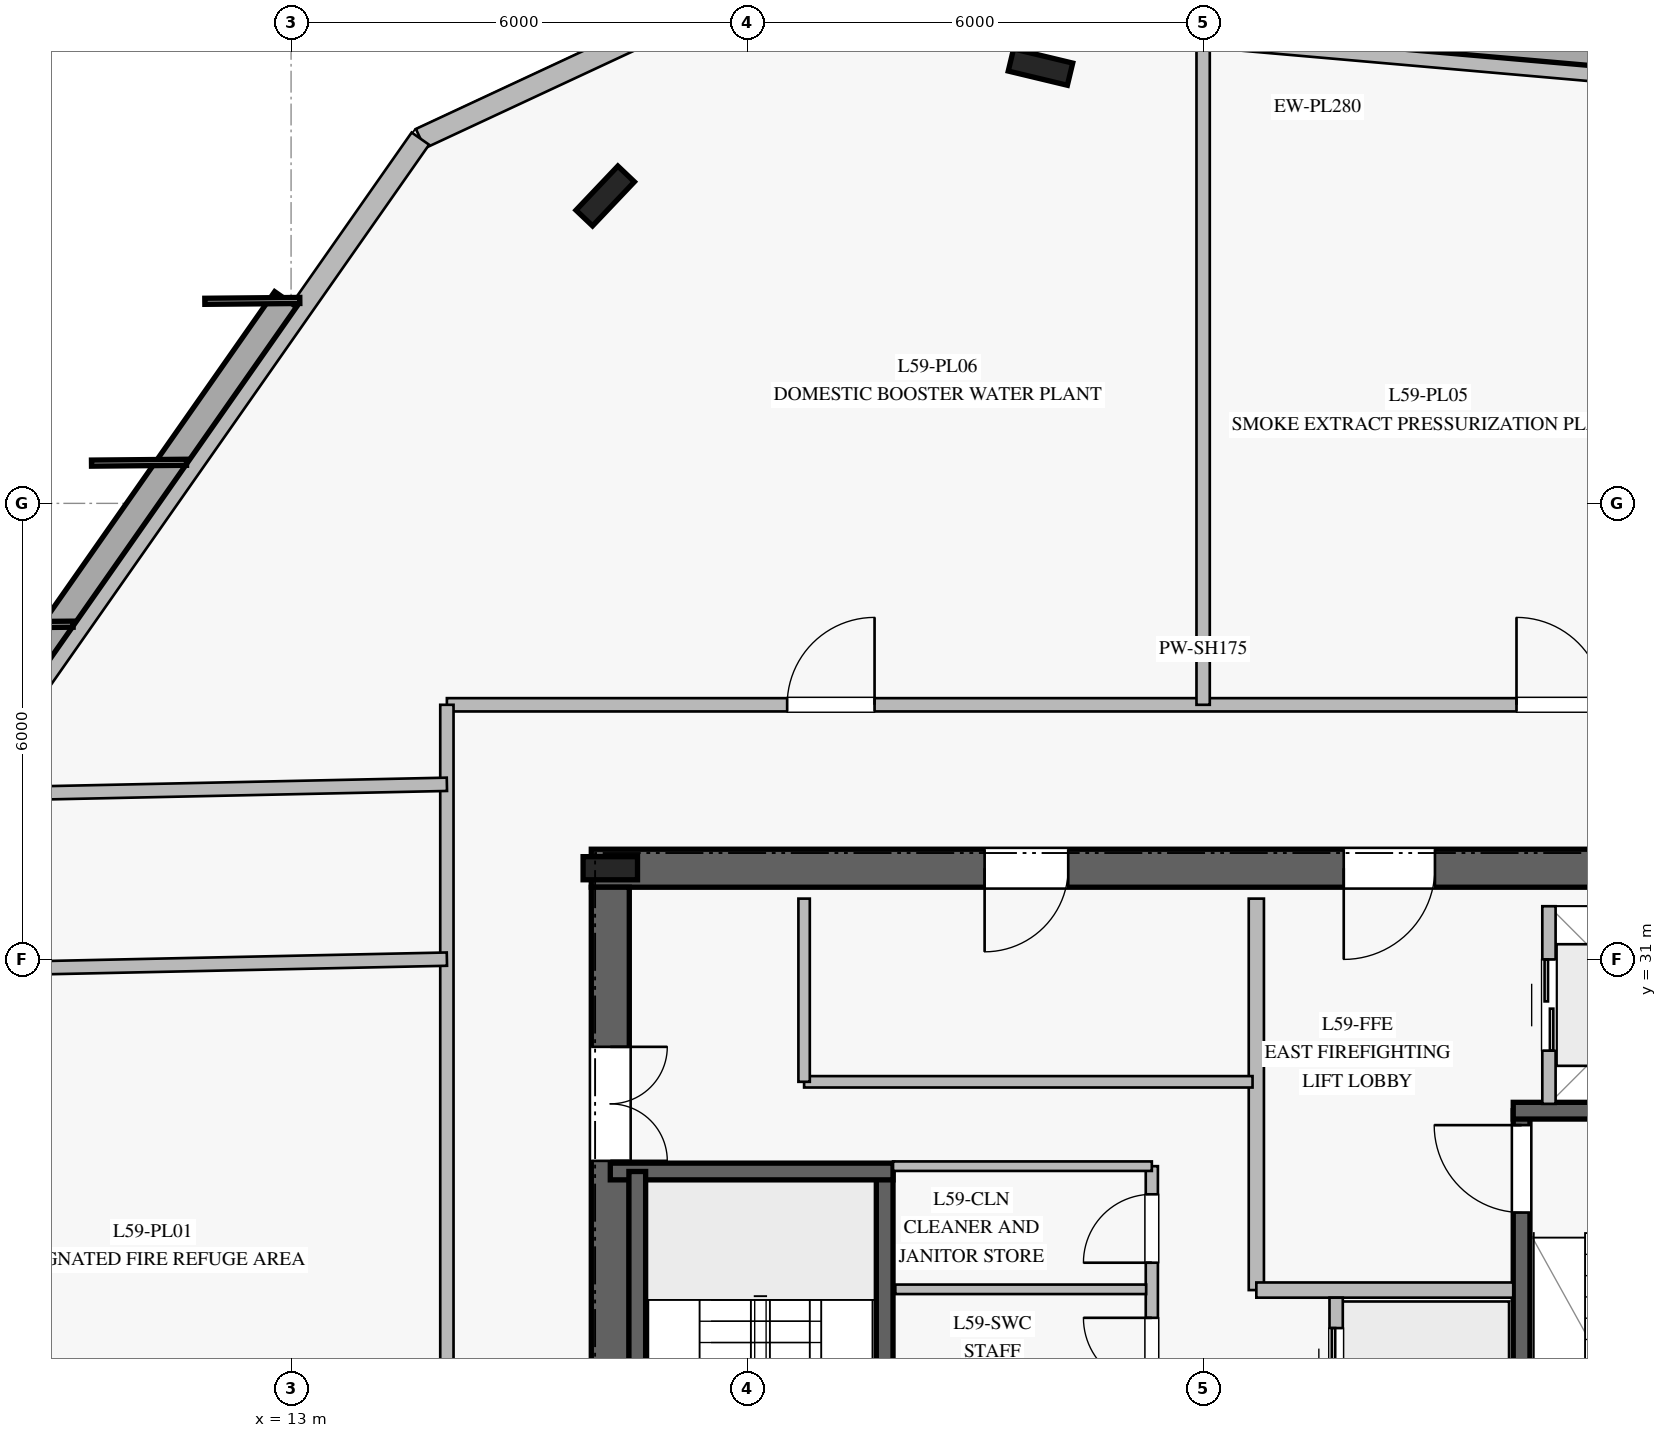
"""IFC4 building model, lengths in metres.
Left out: names, types, materials, properties, quantities, classifications, styles, units other than length and angle.
Written with IfcOpenShell. Run it as: python <this file> out.ifc"""

import sys

from ifc_helpers import new_model, si_unit, direction, frame, frame_2d, origin, origin_2d, place, context, subcontext, project, spatial, rectangle, i_section, extrude, element, fill, save


model = new_model("IFC4")
c1 = context("Model", 3, precision=1e-05, world=origin(), true_north=direction((0.0, 1.0)))
c2 = subcontext(c1, "Body", "Model", "MODEL_VIEW")
j1 = project(units=[si_unit("LENGTHUNIT", "METRE"), si_unit("PLANEANGLEUNIT", "RADIAN")], contexts=[c1])
p1 = place(None, origin())
s1 = spatial("IfcSite", under=j1, at=p1, CompositionType="ELEMENT")
p2 = place(p1, origin())
s2 = spatial("IfcBuilding", under=s1, at=p2, CompositionType="ELEMENT")
p3 = place(p2, frame((0.0, 0.0, 244.8)))
s3 = spatial("IfcBuildingStorey", under=s2, at=p3, CompositionType="ELEMENT", Elevation=244.8)
p4 = place(p3, frame((33.05, 32.2, 0.0), z_axis=(0.0, 0.0, 1.0), x_axis=(-1.0, 0.0, 0.0)))
e1 = element("IfcWall", 1, at=p4, inside=s3, PredefinedType="SHEAR", context=c2, shape_type="SweptSolid", body=[
    extrude(rectangle(XDim=16.1, YDim=0.5, at=frame_2d((8.05, 0.0))), origin(), (0.0, 0.0, 1.0), 5.18),
])
p5 = place(p4, frame((5.0, 0.0, 0.0)))
e2 = element("IfcOpeningElement", 2, at=p5, cuts=e1, PredefinedType="OPENING", context=c2, shape_type="SweptSolid", body=[
    extrude(rectangle(XDim=1.2, YDim=2.25, at=frame_2d((0.6, 1.125))), frame((0.0, 0.26, 0.0), z_axis=(0.0, -1.0, 0.0), x_axis=(1.0, 0.0, 0.0)), (0.0, 0.0, 1.0), 0.52),
])
p6 = place(p4, frame((9.825, 0.0, 0.0)))
e3 = element("IfcOpeningElement", 3, at=p6, cuts=e1, PredefinedType="OPENING", context=c2, shape_type="SweptSolid", body=[
    extrude(rectangle(XDim=1.1, YDim=2.2, at=frame_2d((0.55, 1.1))), frame((0.0, 0.26, 0.0), z_axis=(0.0, -1.0, 0.0), x_axis=(1.0, 0.0, 0.0)), (0.0, 0.0, 1.0), 0.52),
])
p7 = place(p3, frame((17.2, 31.95, 0.0), z_axis=(0.0, 0.0, 1.0), x_axis=(0.0, -1.0, 0.0)))
e4 = element("IfcWall", 4, at=p7, inside=s3, PredefinedType="SHEAR", context=c2, shape_type="SweptSolid", body=[
    extrude(rectangle(XDim=13.9, YDim=0.5, at=frame_2d((6.95, 0.0))), origin(), (0.0, 0.0, 1.0), 5.18),
])
p8 = place(p7, frame((2.1, 0.0, 0.0)))
e5 = element("IfcOpeningElement", 5, at=p8, cuts=e4, PredefinedType="OPENING", context=c2, shape_type="SweptSolid", body=[
    extrude(rectangle(XDim=1.5, YDim=2.2, at=frame_2d((0.75, 1.1))), frame((0.0, 0.26, 0.0), z_axis=(0.0, -1.0, 0.0), x_axis=(1.0, 0.0, 0.0)), (0.0, 0.0, 1.0), 0.52),
])
p9 = place(p3, frame((17.2, 32.2, 0.0), z_axis=(0.0, 0.0, 1.0), x_axis=(1.0, 0.0, 0.0)))
e6 = element("IfcColumn", 6, at=p9, inside=s3, PredefinedType="COLUMN", context=c2, shape_type="SweptSolid", body=[
    extrude(i_section(OverallWidth=0.304, OverallDepth=0.716, WebThickness=0.021, FlangeThickness=0.04, at=origin_2d()), origin(), (0.0, 0.0, 1.0), 5.4),
])
p10 = place(p3, frame((20.81, 20.99, 0.0), z_axis=(0.0, 0.0, 1.0), x_axis=(0.0, 1.0, 0.0)))
e7 = element("IfcWall", 7, at=p10, inside=s3, PredefinedType="SOLIDWALL", context=c2, shape_type="SweptSolid", body=[
    extrude(rectangle(XDim=7.22, YDim=0.22, at=frame_2d((3.61, 0.0))), origin(), (0.0, 0.0, 1.0), 5.18),
])
p11 = place(p10, frame((0.18, 0.0, 0.0)))
e8 = element("IfcOpeningElement", 8, at=p11, cuts=e7, PredefinedType="OPENING", context=c2, shape_type="SweptSolid", body=[
    extrude(rectangle(XDim=1.15, YDim=2.2, at=frame_2d((0.575, 1.1))), frame((0.0, 0.12, 0.0), z_axis=(0.0, -1.0, 0.0), x_axis=(1.0, 0.0, 0.0)), (0.0, 0.0, 1.0), 0.24),
])
p12 = place(p3, frame((17.2, 28.21, 0.0), z_axis=(0.0, 0.0, 1.0), x_axis=(1.0, 0.0, 0.0)))
e9 = element("IfcWall", 9, at=p12, inside=s3, PredefinedType="SOLIDWALL", context=c2, shape_type="SweptSolid", body=[
    extrude(rectangle(XDim=3.72, YDim=0.22, at=frame_2d((1.86, 0.0))), origin(), (0.0, 0.0, 1.0), 5.18),
])
p13 = place(p3, frame((17.555, 28.21, 0.0), z_axis=(0.0, 0.0, 1.0), x_axis=(0.0, -1.0, 0.0)))
e10 = element("IfcWall", 10, at=p13, inside=s3, PredefinedType="SOLIDWALL", context=c2, shape_type="SweptSolid", body=[
    extrude(rectangle(XDim=7.22, YDim=0.22, at=frame_2d((3.61, 0.0))), origin(), (0.0, 0.0, 1.0), 5.18),
])
p14 = place(p3, frame((29.19, 21.79, 0.0), z_axis=(0.0, 0.0, 1.0), x_axis=(0.0, 1.0, 0.0)))
e11 = element("IfcWall", 11, at=p14, inside=s3, PredefinedType="SOLIDWALL", context=c2, shape_type="SweptSolid", body=[
    extrude(rectangle(XDim=7.22, YDim=0.22, at=frame_2d((3.61, 0.0))), origin(), (0.0, 0.0, 1.0), 5.18),
])
p15 = place(p14, frame((5.88, 0.0, 0.0)))
e12 = element("IfcOpeningElement", 12, at=p15, cuts=e11, PredefinedType="OPENING", context=c2, shape_type="SweptSolid", body=[
    extrude(rectangle(XDim=1.15, YDim=2.2, at=frame_2d((0.575, 1.1))), frame((0.0, 0.12, 0.0), z_axis=(0.0, -1.0, 0.0), x_axis=(1.0, 0.0, 0.0)), (0.0, 0.0, 1.0), 0.24),
])
p16 = place(p3, frame((29.08, 29.01, 0.0), z_axis=(0.0, 0.0, 1.0), x_axis=(1.0, 0.0, 0.0)))
e13 = element("IfcWall", 13, at=p16, inside=s3, PredefinedType="SOLIDWALL", context=c2, shape_type="SweptSolid", body=[
    extrude(rectangle(XDim=3.72, YDim=0.22, at=frame_2d((1.86, 0.0))), origin(), (0.0, 0.0, 1.0), 5.18),
])
for number, where, z_axis, x_axis in (
    (14, (22.86, 42.74, 0.0), (0.0, 0.0, 1.0), (-0.972, 0.233, 0.0)),
    (15, (17.133, 41.044, 0.0), (0.0, 0.0, 1.0), (0.688, 0.725, 0.0)),
):
    element("IfcColumn", number, at=place(p3, frame(where, z_axis=z_axis, x_axis=x_axis)), inside=s3, PredefinedType="COLUMN", context=c2, shape_type="SweptSolid", body=[
        extrude(i_section(OverallWidth=0.3, OverallDepth=0.8, WebThickness=0.018, FlangeThickness=0.033, at=origin_2d()), origin(), (0.0, 0.0, 1.0), 5.4),
    ])
p17 = place(p3, frame((34.399, 42.318, 0.0), z_axis=(0.0, 0.0, 1.0), x_axis=(-0.996195370644, 0.087148055094, 0.0)))
e16 = element("IfcWall", 16, at=p17, inside=s3, PredefinedType="STANDARD", context=c2, shape_type="SweptSolid", body=[
    extrude(rectangle(XDim=15.708, YDim=0.28, at=frame_2d((7.854, 0.0))), origin(), (0.0, 0.0, 1.0), 5.18),
])
p18 = place(p3, frame((18.751, 43.687, 0.0), z_axis=(0.0, 0.0, 1.0), x_axis=(-0.906361723837, -0.422502574624, 0.0)))
e17 = element("IfcWall", 17, at=p18, inside=s3, PredefinedType="STANDARD", context=c2, shape_type="SweptSolid", body=[
    extrude(rectangle(XDim=4.469, YDim=0.28, at=frame_2d((2.234, 0.0))), origin(), (0.0, 0.0, 1.0), 5.18),
])
p19 = place(p3, frame((14.701, 41.799, 0.0), z_axis=(0.0, 0.0, 1.0), x_axis=(-0.573547879244, -0.819172039449, 0.0)))
e18 = element("IfcWall", 18, at=p19, inside=s3, PredefinedType="STANDARD", context=c2, shape_type="SweptSolid", body=[
    extrude(rectangle(XDim=15.708, YDim=0.28, at=frame_2d((7.854, 0.0))), origin(), (0.0, 0.0, 1.0), 5.18),
])
p20 = place(p3, frame((25.7, 26.65, 0.0), z_axis=(0.0, 0.0, 1.0), x_axis=(0.0, 1.0, 0.0)))
e19 = element("IfcWall", 19, at=p20, inside=s3, PredefinedType="PARTITIONING", context=c2, shape_type="SweptSolid", body=[
    extrude(rectangle(XDim=5.15, YDim=0.2, at=frame_2d((2.575, 0.0))), origin(), (0.0, 0.0, 1.0), 5.18),
])
p21 = place(p3, frame((25.7, 26.65, 0.0), z_axis=(0.0, 0.0, 1.0), x_axis=(1.0, 0.0, 0.0)))
e20 = element("IfcWall", 20, at=p21, inside=s3, PredefinedType="PARTITIONING", context=c2, shape_type="SweptSolid", body=[
    extrude(rectangle(XDim=3.38, YDim=0.2, at=frame_2d((1.69, 0.0))), origin(), (0.0, 0.0, 1.0), 5.18),
])
p22 = place(p3, frame((24.325, 23.35, 0.0), z_axis=(0.0, 0.0, 1.0), x_axis=(0.0, 1.0, 0.0)))
e21 = element("IfcWall", 21, at=p22, inside=s3, PredefinedType="PLUMBINGWALL", context=c2, shape_type="SweptSolid", body=[
    extrude(rectangle(XDim=4.93, YDim=0.16, at=frame_2d((2.465, 0.0))), origin(), (0.0, 0.0, 1.0), 5.18),
])
p23 = place(p22, frame((0.375, 0.0, 0.0)))
e22 = element("IfcOpeningElement", 22, at=p23, cuts=e21, PredefinedType="OPENING", context=c2, shape_type="SweptSolid", body=[
    extrude(rectangle(XDim=0.95, YDim=2.1, at=frame_2d((0.475, 1.05))), frame((0.0, 0.09, 0.0), z_axis=(0.0, -1.0, 0.0), x_axis=(1.0, 0.0, 0.0)), (0.0, 0.0, 1.0), 0.18),
])
p24 = place(p22, frame((2.035, 0.0, 0.0)))
e23 = element("IfcOpeningElement", 23, at=p24, cuts=e21, PredefinedType="OPENING", context=c2, shape_type="SweptSolid", body=[
    extrude(rectangle(XDim=0.9, YDim=2.1, at=frame_2d((0.45, 1.05))), frame((0.0, 0.09, 0.0), z_axis=(0.0, -1.0, 0.0), x_axis=(1.0, 0.0, 0.0)), (0.0, 0.0, 1.0), 0.18),
])
p25 = place(p22, frame((3.66, 0.0, 0.0)))
e24 = element("IfcOpeningElement", 24, at=p25, cuts=e21, PredefinedType="OPENING", context=c2, shape_type="SweptSolid", body=[
    extrude(rectangle(XDim=0.9, YDim=2.1, at=frame_2d((0.45, 1.05))), frame((0.0, 0.09, 0.0), z_axis=(0.0, -1.0, 0.0), x_axis=(1.0, 0.0, 0.0)), (0.0, 0.0, 1.0), 0.18),
])
p26 = place(p3, frame((20.92, 28.28, 0.0), z_axis=(0.0, 0.0, 1.0), x_axis=(1.0, 0.0, 0.0)))
e25 = element("IfcWall", 25, at=p26, inside=s3, PredefinedType="PARTITIONING", context=c2, shape_type="SweptSolid", body=[
    extrude(rectangle(XDim=3.405, YDim=0.125, at=frame_2d((1.703, 0.0))), origin(), (0.0, 0.0, 1.0), 5.18),
])
p27 = place(p3, frame((20.95, 26.66, 0.0), z_axis=(0.0, 0.0, 1.0), x_axis=(1.0, 0.0, 0.0)))
e26 = element("IfcWall", 26, at=p27, inside=s3, PredefinedType="PARTITIONING", context=c2, shape_type="SweptSolid", body=[
    extrude(rectangle(XDim=3.3, YDim=0.125, at=frame_2d((1.65, 0.0))), origin(), (0.0, 0.0, 1.0), 5.18),
])
p28 = place(p3, frame((19.75, 29.39, 0.0), z_axis=(0.0, 0.0, 1.0), x_axis=(1.0, 0.0, 0.0)))
e27 = element("IfcWall", 27, at=p28, inside=s3, PredefinedType="PARTITIONING", context=c2, shape_type="SweptSolid", body=[
    extrude(rectangle(XDim=5.9, YDim=0.15, at=frame_2d((2.95, 0.0))), origin(), (0.0, 0.0, 1.0), 5.18),
])
p29 = place(p3, frame((19.75, 29.39, 0.0), z_axis=(0.0, 0.0, 1.0), x_axis=(0.0, 1.0, 0.0)))
e28 = element("IfcWall", 28, at=p29, inside=s3, PredefinedType="PARTITIONING", context=c2, shape_type="SweptSolid", body=[
    extrude(rectangle(XDim=2.41, YDim=0.15, at=frame_2d((1.205, 0.0))), origin(), (0.0, 0.0, 1.0), 5.18),
])
p30 = place(p3, frame((26.75, 24.65, 0.0), z_axis=(0.0, 0.0, 1.0), x_axis=(0.0, 1.0, 0.0)))
e29 = element("IfcWall", 29, at=p30, inside=s3, PredefinedType="PARTITIONING", context=c2, shape_type="SweptSolid", body=[
    extrude(rectangle(XDim=1.9, YDim=0.175, at=frame_2d((0.95, 0.0))), origin(), (0.0, 0.0, 1.0), 5.18),
])
p31 = place(p30, frame((0.4, 0.0, 0.0)))
e30 = element("IfcOpeningElement", 30, at=p31, cuts=e29, PredefinedType="OPENING", context=c2, shape_type="SweptSolid", body=[
    extrude(rectangle(XDim=1.1, YDim=2.2, at=frame_2d((0.55, 1.1))), frame((0.0, 0.098, 0.0), z_axis=(0.0, -1.0, 0.0), x_axis=(1.0, 0.0, 0.0)), (0.0, 0.0, 1.0), 0.195),
])
p32 = place(p3, frame((29.55, 29.1, 0.0), z_axis=(0.0, 0.0, 1.0), x_axis=(0.0, 1.0, 0.0)))
e31 = element("IfcWall", 31, at=p32, inside=s3, PredefinedType="PARTITIONING", context=c2, shape_type="SweptSolid", body=[
    extrude(rectangle(XDim=2.6, YDim=0.175, at=frame_2d((1.3, 0.0))), origin(), (0.0, 0.0, 1.0), 5.18),
])
p33 = place(p32, frame((0.7, 0.0, 0.0)))
e32 = element("IfcOpeningElement", 32, at=p33, cuts=e31, PredefinedType="OPENING", context=c2, shape_type="SweptSolid", body=[
    extrude(rectangle(XDim=1.2, YDim=2.2, at=frame_2d((0.6, 1.1))), frame((0.0, 0.098, 0.0), z_axis=(0.0, -1.0, 0.0), x_axis=(1.0, 0.0, 0.0)), (0.0, 0.0, 1.0), 0.195),
])
p34 = place(p3, frame((15.05, 34.35, 0.0), z_axis=(0.0, 0.0, 1.0), x_axis=(1.0, 0.0, 0.0)))
e33 = element("IfcWall", 33, at=p34, inside=s3, PredefinedType="PARTITIONING", context=c2, shape_type="SweptSolid", body=[
    extrude(rectangle(XDim=19.9, YDim=0.175, at=frame_2d((9.95, 0.0))), origin(), (0.0, 0.0, 1.0), 3.78),
])
p35 = place(p34, frame((14.073, 0.0, 0.0)))
e34 = element("IfcOpeningElement", 34, at=p35, cuts=e33, PredefinedType="OPENING", context=c2, shape_type="SweptSolid", body=[
    extrude(rectangle(XDim=1.15, YDim=2.2, at=frame_2d((0.575, 1.1))), frame((0.0, 0.098, 0.0), z_axis=(0.0, -1.0, 0.0), x_axis=(1.0, 0.0, 0.0)), (0.0, 0.0, 1.0), 0.195),
])
p36 = place(p34, frame((4.477, 0.0, 0.0)))
e35 = element("IfcOpeningElement", 35, at=p36, cuts=e33, PredefinedType="OPENING", context=c2, shape_type="SweptSolid", body=[
    extrude(rectangle(XDim=1.15, YDim=2.2, at=frame_2d((0.575, 1.1))), frame((0.0, 0.098, 0.0), z_axis=(0.0, -1.0, 0.0), x_axis=(1.0, 0.0, 0.0)), (0.0, 0.0, 1.0), 0.195),
])
p37 = place(p3, frame((15.05, 15.65, 0.0), z_axis=(0.0, 0.0, 1.0), x_axis=(0.0, 1.0, 0.0)))
e36 = element("IfcWall", 36, at=p37, inside=s3, PredefinedType="PARTITIONING", context=c2, shape_type="SweptSolid", body=[
    extrude(rectangle(XDim=18.7, YDim=0.175, at=frame_2d((9.35, 0.0))), origin(), (0.0, 0.0, 1.0), 3.78),
])
p38 = place(p37, frame((8.113, 0.0, 0.0)))
e37 = element("IfcOpeningElement", 37, at=p38, cuts=e36, PredefinedType="OPENING", context=c2, shape_type="SweptSolid", body=[
    extrude(rectangle(XDim=1.2, YDim=2.25, at=frame_2d((0.6, 1.125))), frame((0.0, 0.098, 0.0), z_axis=(0.0, -1.0, 0.0), x_axis=(1.0, 0.0, 0.0)), (0.0, 0.0, 1.0), 0.195),
])
p39 = place(p3, frame((15.05, 33.304, 0.0), z_axis=(0.0, 0.0, 1.0), x_axis=(-0.99977397531, -0.021260251479, 0.0)))
e38 = element("IfcWall", 38, at=p39, inside=s3, PredefinedType="PARTITIONING", context=c2, shape_type="SweptSolid", body=[
    extrude(rectangle(XDim=6.304, YDim=0.175, at=frame_2d((3.152, 0.0))), origin(), (0.0, 0.0, 1.0), 3.78),
])
p40 = place(p3, frame((15.05, 31.004, 0.0), z_axis=(0.0, 0.0, 1.0), x_axis=(-0.9997735909, -0.021278320874, 0.0)))
e39 = element("IfcWall", 39, at=p40, inside=s3, PredefinedType="PARTITIONING", context=c2, shape_type="SweptSolid", body=[
    extrude(rectangle(XDim=7.94, YDim=0.175, at=frame_2d((3.97, 0.0))), origin(), (0.0, 0.0, 1.0), 3.78),
])
p41 = place(p3, frame((25.0, 34.35, 0.0), z_axis=(0.0, 0.0, 1.0), x_axis=(0.0, 1.0, 0.0)))
e40 = element("IfcWall", 40, at=p41, inside=s3, PredefinedType="PARTITIONING", context=c2, shape_type="SweptSolid", body=[
    extrude(rectangle(XDim=8.719, YDim=0.175, at=frame_2d((4.359, 0.0))), origin(), (0.0, 0.0, 1.0), 3.78),
])
p42 = place(p15, origin())
e41 = element("IfcDoor", 41, at=p42, inside=s3, OperationType="SINGLE_SWING_RIGHT", PredefinedType="DOOR", context=c2, shape_type="SweptSolid", body=[
    extrude(rectangle(XDim=1.15, YDim=2.2, at=frame_2d((0.575, 1.1))), frame((0.0, 0.025, 0.0), z_axis=(0.0, -1.0, 0.0), x_axis=(1.0, 0.0, 0.0)), (0.0, 0.0, 1.0), 0.05),
])
fill(e12, e41)
p43 = place(p5, origin())
e42 = element("IfcDoor", 42, at=p43, inside=s3, OperationType="SINGLE_SWING_RIGHT", PredefinedType="DOOR", context=c2, shape_type="SweptSolid", body=[
    extrude(rectangle(XDim=1.2, YDim=2.25, at=frame_2d((0.6, 1.125))), frame((0.0, 0.025, 0.0), z_axis=(0.0, -1.0, 0.0), x_axis=(1.0, 0.0, 0.0)), (0.0, 0.0, 1.0), 0.05),
])
fill(e2, e42)
p44 = place(p8, origin())
e43 = element("IfcDoor", 43, at=p44, inside=s3, OperationType="DOUBLE_DOOR_SINGLE_SWING", PredefinedType="DOOR", context=c2, shape_type="SweptSolid", body=[
    extrude(rectangle(XDim=1.5, YDim=2.2, at=frame_2d((0.75, 1.1))), frame((0.0, 0.025, 0.0), z_axis=(0.0, -1.0, 0.0), x_axis=(1.0, 0.0, 0.0)), (0.0, 0.0, 1.0), 0.05),
])
fill(e5, e43)
p45 = place(p24, origin())
e44 = element("IfcDoor", 44, at=p45, inside=s3, OperationType="SINGLE_SWING_RIGHT", PredefinedType="DOOR", context=c2, shape_type="SweptSolid", body=[
    extrude(rectangle(XDim=0.9, YDim=2.1, at=frame_2d((0.45, 1.05))), frame((0.0, 0.025, 0.0), z_axis=(0.0, -1.0, 0.0), x_axis=(1.0, 0.0, 0.0)), (0.0, 0.0, 1.0), 0.05),
])
fill(e23, e44)
p46 = place(p25, origin())
e45 = element("IfcDoor", 45, at=p46, inside=s3, OperationType="SINGLE_SWING_LEFT", PredefinedType="DOOR", context=c2, shape_type="SweptSolid", body=[
    extrude(rectangle(XDim=0.9, YDim=2.1, at=frame_2d((0.45, 1.05))), frame((0.0, 0.025, 0.0), z_axis=(0.0, -1.0, 0.0), x_axis=(1.0, 0.0, 0.0)), (0.0, 0.0, 1.0), 0.05),
])
fill(e24, e45)
p47 = place(p6, origin())
e46 = element("IfcDoor", 46, at=p47, inside=s3, OperationType="SINGLE_SWING_RIGHT", PredefinedType="DOOR", context=c2, shape_type="SweptSolid", body=[
    extrude(rectangle(XDim=1.1, YDim=2.2, at=frame_2d((0.55, 1.1))), frame((0.0, 0.025, 0.0), z_axis=(0.0, -1.0, 0.0), x_axis=(1.0, 0.0, 0.0)), (0.0, 0.0, 1.0), 0.05),
])
fill(e3, e46)
p48 = place(p31, origin())
e47 = element("IfcDoor", 47, at=p48, inside=s3, OperationType="DOUBLE_DOOR_SLIDING", PredefinedType="DOOR", context=c2, shape_type="SweptSolid", body=[
    extrude(rectangle(XDim=1.1, YDim=2.2, at=frame_2d((0.55, 1.1))), frame((0.0, 0.025, 0.0), z_axis=(0.0, -1.0, 0.0), x_axis=(1.0, 0.0, 0.0)), (0.0, 0.0, 1.0), 0.05),
])
fill(e30, e47)
p49 = place(p33, origin())
e48 = element("IfcDoor", 48, at=p49, inside=s3, OperationType="DOUBLE_DOOR_SLIDING", PredefinedType="DOOR", context=c2, shape_type="SweptSolid", body=[
    extrude(rectangle(XDim=1.2, YDim=2.2, at=frame_2d((0.6, 1.1))), frame((0.0, 0.025, 0.0), z_axis=(0.0, -1.0, 0.0), x_axis=(1.0, 0.0, 0.0)), (0.0, 0.0, 1.0), 0.05),
])
fill(e32, e48)
p50 = place(p35, origin())
e49 = element("IfcDoor", 49, at=p50, inside=s3, OperationType="SINGLE_SWING_LEFT", PredefinedType="DOOR", context=c2, shape_type="SweptSolid", body=[
    extrude(rectangle(XDim=1.15, YDim=2.2, at=frame_2d((0.575, 1.1))), frame((0.0, 0.025, 0.0), z_axis=(0.0, -1.0, 0.0), x_axis=(1.0, 0.0, 0.0)), (0.0, 0.0, 1.0), 0.05),
])
fill(e34, e49)
p51 = place(p36, origin())
e50 = element("IfcDoor", 50, at=p51, inside=s3, OperationType="SINGLE_SWING_RIGHT", PredefinedType="DOOR", context=c2, shape_type="SweptSolid", body=[
    extrude(rectangle(XDim=1.15, YDim=2.2, at=frame_2d((0.575, 1.1))), frame((0.0, 0.025, 0.0), z_axis=(0.0, -1.0, 0.0), x_axis=(1.0, 0.0, 0.0)), (0.0, 0.0, 1.0), 0.05),
])
fill(e35, e50)
save(model, sys.argv[1])
